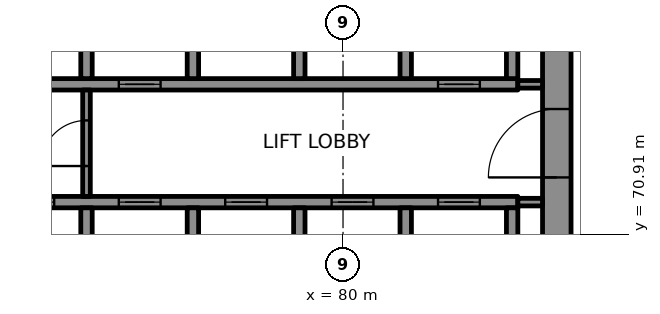
"""IFC4 building model, lengths in metres.
Left out: names, types, materials, properties, quantities, classifications, styles, units other than length and angle.
Written with IfcOpenShell. Run it as: python <this file> out.ifc"""

import sys

from ifc_helpers import new_model, si_unit, direction, frame, frame_2d, origin, place, context, subcontext, project, spatial, rectangle, extrude, element, fill, save


model = new_model("IFC4")
c1 = context("Model", 3, precision=1e-05, world=origin(), true_north=direction((0.0, 1.0)))
c2 = subcontext(c1, "Body", "Model", "MODEL_VIEW")
j1 = project(units=[si_unit("LENGTHUNIT", "METRE"), si_unit("PLANEANGLEUNIT", "RADIAN")], contexts=[c1])
p1 = place(None, origin())
s1 = spatial("IfcSite", under=j1, at=p1, CompositionType="ELEMENT")
p2 = place(p1, origin())
s2 = spatial("IfcBuilding", under=s1, at=p2, CompositionType="ELEMENT")
p3 = place(p2, frame((0.0, 0.0, 146.8)))
s3 = spatial("IfcBuildingStorey", under=s2, at=p3, CompositionType="ELEMENT", Elevation=146.8)
p4 = place(p3, frame((85.625, 67.75, 0.0), z_axis=(0.0, 0.0, 1.0), x_axis=(0.0, 1.0, 0.0)))
e1 = element("IfcWall", 1, at=p4, inside=s3, PredefinedType="SHEAR", context=c2, shape_type="SweptSolid", body=[
    extrude(rectangle(XDim=14.5, YDim=0.75, at=frame_2d((7.25, 0.0))), origin(), (0.0, 0.0, 1.0), 4.05),
])
p5 = place(p4, frame((4.65, 0.0, 0.0)))
e2 = element("IfcOpeningElement", 2, at=p5, cuts=e1, PredefinedType="OPENING", context=c2, shape_type="SweptSolid", body=[
    extrude(rectangle(XDim=1.8, YDim=2.1, at=frame_2d((0.9, 1.05))), frame((0.0, 0.385, 0.0), z_axis=(0.0, -1.0, 0.0), x_axis=(1.0, 0.0, 0.0)), (0.0, 0.0, 1.0), 0.77),
])
p6 = place(p4, frame((11.8, 0.0, 0.0)))
e3 = element("IfcOpeningElement", 3, at=p6, cuts=e1, PredefinedType="OPENING", context=c2, shape_type="SweptSolid", body=[
    extrude(rectangle(XDim=0.9, YDim=2.1, at=frame_2d((0.45, 1.05))), frame((0.0, 0.385, 0.0), z_axis=(0.0, -1.0, 0.0), x_axis=(1.0, 0.0, 0.0)), (0.0, 0.0, 1.0), 0.77),
])
p7 = place(p3, frame((70.3, 71.75, 0.0), z_axis=(0.0, 0.0, 1.0), x_axis=(1.0, 0.0, 0.0)))
e4 = element("IfcWall", 4, at=p7, inside=s3, PredefinedType="SHEAR", context=c2, shape_type="SweptSolid", body=[
    extrude(rectangle(XDim=14.3, YDim=0.3, at=frame_2d((7.15, 0.0))), origin(), (0.0, 0.0, 1.0), 4.05),
])
p8 = place(p7, frame((1.0, 0.0, 0.0)))
e5 = element("IfcOpeningElement", 5, at=p8, cuts=e4, PredefinedType="OPENING", context=c2, shape_type="SweptSolid", body=[
    extrude(rectangle(XDim=1.1, YDim=2.1, at=frame_2d((0.55, 1.05))), frame((0.0, 0.16, 0.0), z_axis=(0.0, -1.0, 0.0), x_axis=(1.0, 0.0, 0.0)), (0.0, 0.0, 1.0), 0.32),
])
p9 = place(p7, frame((3.8, 0.0, 0.0)))
e6 = element("IfcOpeningElement", 6, at=p9, cuts=e4, PredefinedType="OPENING", context=c2, shape_type="SweptSolid", body=[
    extrude(rectangle(XDim=1.1, YDim=2.1, at=frame_2d((0.55, 1.05))), frame((0.0, 0.16, 0.0), z_axis=(0.0, -1.0, 0.0), x_axis=(1.0, 0.0, 0.0)), (0.0, 0.0, 1.0), 0.32),
])
p10 = place(p7, frame((6.6, 0.0, 0.0)))
e7 = element("IfcOpeningElement", 7, at=p10, cuts=e4, PredefinedType="OPENING", context=c2, shape_type="SweptSolid", body=[
    extrude(rectangle(XDim=1.1, YDim=2.1, at=frame_2d((0.55, 1.05))), frame((0.0, 0.16, 0.0), z_axis=(0.0, -1.0, 0.0), x_axis=(1.0, 0.0, 0.0)), (0.0, 0.0, 1.0), 0.32),
])
p11 = place(p7, frame((9.4, 0.0, 0.0)))
e8 = element("IfcOpeningElement", 8, at=p11, cuts=e4, PredefinedType="OPENING", context=c2, shape_type="SweptSolid", body=[
    extrude(rectangle(XDim=1.1, YDim=2.1, at=frame_2d((0.55, 1.05))), frame((0.0, 0.16, 0.0), z_axis=(0.0, -1.0, 0.0), x_axis=(1.0, 0.0, 0.0)), (0.0, 0.0, 1.0), 0.32),
])
p12 = place(p7, frame((12.2, 0.0, 0.0)))
e9 = element("IfcOpeningElement", 9, at=p12, cuts=e4, PredefinedType="OPENING", context=c2, shape_type="SweptSolid", body=[
    extrude(rectangle(XDim=1.1, YDim=2.1, at=frame_2d((0.55, 1.05))), frame((0.0, 0.16, 0.0), z_axis=(0.0, -1.0, 0.0), x_axis=(1.0, 0.0, 0.0)), (0.0, 0.0, 1.0), 0.32),
])
p13 = place(p3, frame((70.3, 74.85, 0.0), z_axis=(0.0, 0.0, 1.0), x_axis=(1.0, 0.0, 0.0)))
e10 = element("IfcWall", 10, at=p13, inside=s3, PredefinedType="SHEAR", context=c2, shape_type="SweptSolid", body=[
    extrude(rectangle(XDim=14.3, YDim=0.3, at=frame_2d((7.15, 0.0))), origin(), (0.0, 0.0, 1.0), 4.05),
])
p14 = place(p13, frame((3.8, 0.0, 0.0)))
e11 = element("IfcOpeningElement", 11, at=p14, cuts=e10, PredefinedType="OPENING", context=c2, shape_type="SweptSolid", body=[
    extrude(rectangle(XDim=1.1, YDim=2.1, at=frame_2d((0.55, 1.05))), frame((0.0, 0.16, 0.0), z_axis=(0.0, -1.0, 0.0), x_axis=(1.0, 0.0, 0.0)), (0.0, 0.0, 1.0), 0.32),
])
p15 = place(p13, frame((12.2, 0.0, 0.0)))
e12 = element("IfcOpeningElement", 12, at=p15, cuts=e10, PredefinedType="OPENING", context=c2, shape_type="SweptSolid", body=[
    extrude(rectangle(XDim=1.1, YDim=2.1, at=frame_2d((0.55, 1.05))), frame((0.0, 0.16, 0.0), z_axis=(0.0, -1.0, 0.0), x_axis=(1.0, 0.0, 0.0)), (0.0, 0.0, 1.0), 0.32),
])
for number, where, z_axis, x_axis in (
    (13, (73.25, 69.0, 0.0), (0.0, 0.0, 1.0), (0.0, 1.0, 0.0)),
    (14, (73.25, 75.0, 0.0), (0.0, 0.0, 1.0), (0.0, 1.0, 0.0)),
    (15, (76.05, 69.0, 0.0), (0.0, 0.0, 1.0), (0.0, 1.0, 0.0)),
    (16, (76.05, 75.0, 0.0), (0.0, 0.0, 1.0), (0.0, 1.0, 0.0)),
    (17, (78.85, 69.0, 0.0), (0.0, 0.0, 1.0), (0.0, 1.0, 0.0)),
    (18, (78.85, 75.0, 0.0), (0.0, 0.0, 1.0), (0.0, 1.0, 0.0)),
    (19, (81.65, 69.0, 0.0), (0.0, 0.0, 1.0), (0.0, 1.0, 0.0)),
    (20, (81.65, 75.0, 0.0), (0.0, 0.0, 1.0), (0.0, 1.0, 0.0)),
    (21, (84.45, 69.0, 0.0), (0.0, 0.0, 1.0), (0.0, 1.0, 0.0)),
    (22, (84.45, 75.0, 0.0), (0.0, 0.0, 1.0), (0.0, 1.0, 0.0)),
):
    element("IfcWall", number, at=place(p3, frame(where, z_axis=z_axis, x_axis=x_axis)), inside=s3, PredefinedType="SHEAR", context=c2, shape_type="SweptSolid", body=[
        extrude(rectangle(XDim=2.6, YDim=0.3, at=frame_2d((1.3, 0.0))), origin(), (0.0, 0.0, 1.0), 4.05),
    ])
p16 = place(p3, frame((106.254, 61.172, 0.0), z_axis=(0.0, 0.0, 1.0), x_axis=(-0.500000383388, 0.866025182435, 0.0)))
e23 = element("IfcWall", 23, at=p16, inside=s3, PredefinedType="SOLIDWALL", context=c2, shape_type="SweptSolid", body=[
    extrude(rectangle(XDim=55.204, YDim=0.3, at=frame_2d((27.602, 0.0))), origin(), (0.0, 0.0, 1.0), 4.05),
])
p17 = place(p16, frame((16.895, 0.0, 0.8)))
e24 = element("IfcOpeningElement", 24, at=p17, cuts=e23, PredefinedType="OPENING", context=c2, shape_type="SweptSolid", body=[
    extrude(rectangle(XDim=3.0, YDim=2.4, at=frame_2d((1.5, 1.2))), frame((0.0, 0.16, 0.0), z_axis=(0.0, -1.0, 0.0), x_axis=(1.0, 0.0, 0.0)), (0.0, 0.0, 1.0), 0.32),
])
p18 = place(p16, frame((35.309, 0.0, 0.8)))
e25 = element("IfcOpeningElement", 25, at=p18, cuts=e23, PredefinedType="OPENING", context=c2, shape_type="SweptSolid", body=[
    extrude(rectangle(XDim=3.0, YDim=2.4, at=frame_2d((1.5, 1.2))), frame((0.0, 0.16, 0.0), z_axis=(0.0, -1.0, 0.0), x_axis=(1.0, 0.0, 0.0)), (0.0, 0.0, 1.0), 0.32),
])
for number, where, z_axis, x_axis in (
    (26, (84.6, 71.75, 0.0), (0.0, 0.0, 1.0), (1.0, 0.0, 0.0)),
    (27, (84.6, 74.85, 0.0), (0.0, 0.0, 1.0), (1.0, 0.0, 0.0)),
):
    element("IfcWall", number, at=place(p3, frame(where, z_axis=z_axis, x_axis=x_axis)), inside=s3, PredefinedType="PARTITIONING", context=c2, shape_type="SweptSolid", body=[
        extrude(rectangle(XDim=0.65, YDim=0.2, at=frame_2d((0.325, 0.0))), origin(), (0.0, 0.0, 1.0), 4.05),
    ])
p19 = place(p3, frame((73.25, 71.9, 0.0), z_axis=(0.0, 0.0, 1.0), x_axis=(0.0, 1.0, 0.0)))
e28 = element("IfcWall", 28, at=p19, inside=s3, PredefinedType="PARTITIONING", context=c2, shape_type="SweptSolid", body=[
    extrude(rectangle(XDim=2.8, YDim=0.2, at=frame_2d((1.4, 0.0))), origin(), (0.0, 0.0, 1.0), 4.05),
])
p20 = place(p19, frame((0.8, 0.0, 0.0)))
e29 = element("IfcOpeningElement", 29, at=p20, cuts=e28, PredefinedType="OPENING", context=c2, shape_type="SweptSolid", body=[
    extrude(rectangle(XDim=1.2, YDim=2.1, at=frame_2d((0.6, 1.05))), frame((0.0, 0.11, 0.0), z_axis=(0.0, -1.0, 0.0), x_axis=(1.0, 0.0, 0.0)), (0.0, 0.0, 1.0), 0.22),
])
p21 = place(p8, origin())
e30 = element("IfcDoor", 30, at=p21, inside=s3, OperationType="DOUBLE_DOOR_SLIDING", PredefinedType="DOOR", context=c2, shape_type="SweptSolid", body=[
    extrude(rectangle(XDim=1.1, YDim=2.1, at=frame_2d((0.55, 1.05))), frame((0.0, 0.025, 0.0), z_axis=(0.0, -1.0, 0.0), x_axis=(1.0, 0.0, 0.0)), (0.0, 0.0, 1.0), 0.05),
])
fill(e5, e30)
p22 = place(p9, origin())
e31 = element("IfcDoor", 31, at=p22, inside=s3, OperationType="DOUBLE_DOOR_SLIDING", PredefinedType="DOOR", context=c2, shape_type="SweptSolid", body=[
    extrude(rectangle(XDim=1.1, YDim=2.1, at=frame_2d((0.55, 1.05))), frame((0.0, 0.025, 0.0), z_axis=(0.0, -1.0, 0.0), x_axis=(1.0, 0.0, 0.0)), (0.0, 0.0, 1.0), 0.05),
])
fill(e6, e31)
p23 = place(p10, origin())
e32 = element("IfcDoor", 32, at=p23, inside=s3, OperationType="DOUBLE_DOOR_SLIDING", PredefinedType="DOOR", context=c2, shape_type="SweptSolid", body=[
    extrude(rectangle(XDim=1.1, YDim=2.1, at=frame_2d((0.55, 1.05))), frame((0.0, 0.025, 0.0), z_axis=(0.0, -1.0, 0.0), x_axis=(1.0, 0.0, 0.0)), (0.0, 0.0, 1.0), 0.05),
])
fill(e7, e32)
p24 = place(p11, origin())
e33 = element("IfcDoor", 33, at=p24, inside=s3, OperationType="DOUBLE_DOOR_SLIDING", PredefinedType="DOOR", context=c2, shape_type="SweptSolid", body=[
    extrude(rectangle(XDim=1.1, YDim=2.1, at=frame_2d((0.55, 1.05))), frame((0.0, 0.025, 0.0), z_axis=(0.0, -1.0, 0.0), x_axis=(1.0, 0.0, 0.0)), (0.0, 0.0, 1.0), 0.05),
])
fill(e8, e33)
p25 = place(p12, origin())
e34 = element("IfcDoor", 34, at=p25, inside=s3, OperationType="DOUBLE_DOOR_SLIDING", PredefinedType="DOOR", context=c2, shape_type="SweptSolid", body=[
    extrude(rectangle(XDim=1.1, YDim=2.1, at=frame_2d((0.55, 1.05))), frame((0.0, 0.025, 0.0), z_axis=(0.0, -1.0, 0.0), x_axis=(1.0, 0.0, 0.0)), (0.0, 0.0, 1.0), 0.05),
])
fill(e9, e34)
p26 = place(p14, origin())
e35 = element("IfcDoor", 35, at=p26, inside=s3, OperationType="DOUBLE_DOOR_SLIDING", PredefinedType="DOOR", context=c2, shape_type="SweptSolid", body=[
    extrude(rectangle(XDim=1.1, YDim=2.1, at=frame_2d((0.55, 1.05))), frame((0.0, 0.025, 0.0), z_axis=(0.0, -1.0, 0.0), x_axis=(1.0, 0.0, 0.0)), (0.0, 0.0, 1.0), 0.05),
])
fill(e11, e35)
p27 = place(p15, origin())
e36 = element("IfcDoor", 36, at=p27, inside=s3, OperationType="DOUBLE_DOOR_SLIDING", PredefinedType="DOOR", context=c2, shape_type="SweptSolid", body=[
    extrude(rectangle(XDim=1.1, YDim=2.1, at=frame_2d((0.55, 1.05))), frame((0.0, 0.025, 0.0), z_axis=(0.0, -1.0, 0.0), x_axis=(1.0, 0.0, 0.0)), (0.0, 0.0, 1.0), 0.05),
])
fill(e12, e36)
p28 = place(p20, origin())
e37 = element("IfcDoor", 37, at=p28, inside=s3, OperationType="SINGLE_SWING_LEFT", PredefinedType="DOOR", context=c2, shape_type="SweptSolid", body=[
    extrude(rectangle(XDim=1.2, YDim=2.1, at=frame_2d((0.6, 1.05))), frame((0.0, 0.025, 0.0), z_axis=(0.0, -1.0, 0.0), x_axis=(1.0, 0.0, 0.0)), (0.0, 0.0, 1.0), 0.05),
])
fill(e29, e37)
p29 = place(p5, origin())
e38 = element("IfcDoor", 38, at=p29, inside=s3, OperationType="SINGLE_SWING_RIGHT", PredefinedType="DOOR", context=c2, shape_type="SweptSolid", body=[
    extrude(rectangle(XDim=1.8, YDim=2.1, at=frame_2d((0.9, 1.05))), frame((0.0, 0.095, 0.0), z_axis=(0.0, -1.0, 0.0), x_axis=(1.0, 0.0, 0.0)), (0.0, 0.0, 1.0), 0.19),
])
fill(e2, e38)
save(model, sys.argv[1])
